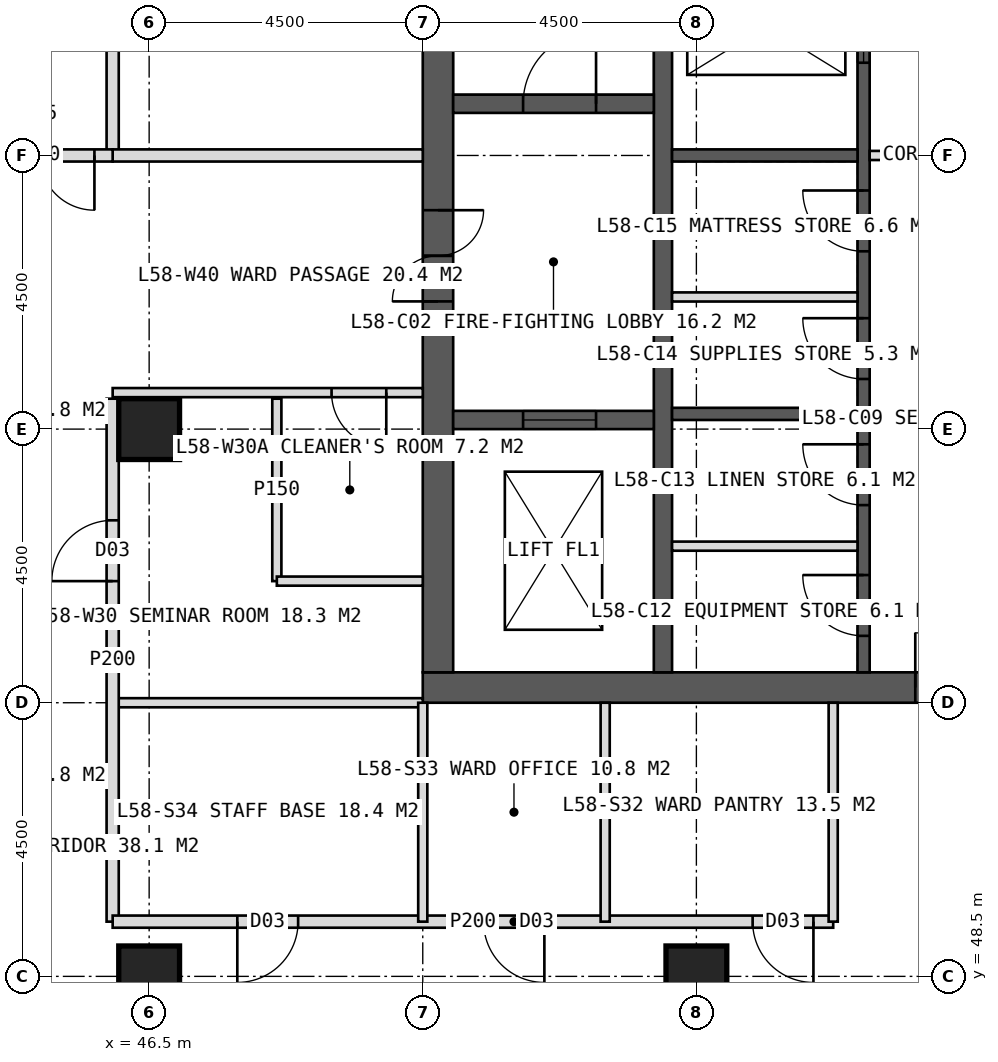
"""IFC4 building model, lengths in metres.
Left out: names, types, materials, properties, quantities, classifications, styles, units other than length and angle.
Written with IfcOpenShell. Run it as: python <this file> out.ifc"""

import sys

from ifc_helpers import new_model, si_unit, direction, frame, frame_2d, origin, origin_2d, place, context, subcontext, project, spatial, rectangle, hollow_rectangle, extrude, element, fill, save


model = new_model("IFC4")
c1 = context("Model", 3, precision=1e-05, world=origin(), true_north=direction((0.0, 1.0)))
c2 = subcontext(c1, "Body", "Model", "MODEL_VIEW")
j1 = project(units=[si_unit("LENGTHUNIT", "METRE"), si_unit("PLANEANGLEUNIT", "RADIAN")], contexts=[c1])
p1 = place(None, origin())
s1 = spatial("IfcSite", under=j1, at=p1, CompositionType="ELEMENT")
p2 = place(p1, origin())
s2 = spatial("IfcBuilding", under=s1, at=p2, CompositionType="ELEMENT")
p3 = place(p2, frame((0.0, 0.0, 241.0)))
s3 = spatial("IfcBuildingStorey", under=s2, at=p3, CompositionType="ELEMENT", Elevation=241.0)
p4 = place(p3, frame((51.0, 53.25, 0.0), z_axis=(0.0, 0.0, 1.0), x_axis=(1.0, 0.0, 0.0)))
e1 = element("IfcWall", 1, at=p4, inside=s3, PredefinedType="SHEAR", context=c2, shape_type="SweptSolid", body=[
    extrude(rectangle(XDim=18.0, YDim=0.5, at=frame_2d((9.0, 0.0))), origin(), (0.0, 0.0, 1.0), 4.0),
])
p5 = place(p4, frame((8.1, 0.0, 0.0)))
e2 = element("IfcOpeningElement", 2, at=p5, cuts=e1, PredefinedType="OPENING", context=c2, shape_type="SweptSolid", body=[
    extrude(rectangle(XDim=1.8, YDim=2.2, at=frame_2d((0.9, 1.1))), frame((0.0, 0.26, 0.0), z_axis=(0.0, -1.0, 0.0), x_axis=(1.0, 0.0, 0.0)), (0.0, 0.0, 1.0), 0.52),
])
p6 = place(p3, frame((51.25, 53.5, 0.0), z_axis=(0.0, 0.0, 1.0), x_axis=(0.0, 1.0, 0.0)))
e3 = element("IfcWall", 3, at=p6, inside=s3, PredefinedType="SHEAR", context=c2, shape_type="SweptSolid", body=[
    extrude(rectangle(XDim=17.0, YDim=0.5, at=frame_2d((8.5, 0.0))), origin(), (0.0, 0.0, 1.0), 4.0),
])
p7 = place(p6, frame((6.1, 0.0, 0.0)))
e4 = element("IfcOpeningElement", 4, at=p7, cuts=e3, PredefinedType="OPENING", context=c2, shape_type="SweptSolid", body=[
    extrude(rectangle(XDim=1.5, YDim=2.2, at=frame_2d((0.75, 1.1))), frame((0.0, 0.26, 0.0), z_axis=(0.0, -1.0, 0.0), x_axis=(1.0, 0.0, 0.0)), (0.0, 0.0, 1.0), 0.52),
])
p8 = place(p3, frame((54.95, 53.5, 0.0), z_axis=(0.0, 0.0, 1.0), x_axis=(0.0, 1.0, 0.0)))
e5 = element("IfcWall", 5, at=p8, inside=s3, PredefinedType="SHEAR", context=c2, shape_type="SweptSolid", body=[
    extrude(rectangle(XDim=17.0, YDim=0.3, at=frame_2d((8.5, 0.0))), origin(), (0.0, 0.0, 1.0), 4.0),
])
p9 = place(p3, frame((58.25, 53.5, 0.0), z_axis=(0.0, 0.0, 1.0), x_axis=(0.0, 1.0, 0.0)))
e6 = element("IfcWall", 6, at=p9, inside=s3, PredefinedType="SHEAR", context=c2, shape_type="SweptSolid", body=[
    extrude(rectangle(XDim=17.0, YDim=0.2, at=frame_2d((8.5, 0.0))), origin(), (0.0, 0.0, 1.0), 4.0),
])
p10 = place(p9, frame((0.6, 0.0, 0.0)))
e7 = element("IfcOpeningElement", 7, at=p10, cuts=e6, PredefinedType="OPENING", context=c2, shape_type="SweptSolid", body=[
    extrude(rectangle(XDim=1.0, YDim=2.1, at=frame_2d((0.5, 1.05))), frame((0.0, 0.11, 0.0), z_axis=(0.0, -1.0, 0.0), x_axis=(1.0, 0.0, 0.0)), (0.0, 0.0, 1.0), 0.22),
])
p11 = place(p9, frame((2.75, 0.0, 0.0)))
e8 = element("IfcOpeningElement", 8, at=p11, cuts=e6, PredefinedType="OPENING", context=c2, shape_type="SweptSolid", body=[
    extrude(rectangle(XDim=1.0, YDim=2.1, at=frame_2d((0.5, 1.05))), frame((0.0, 0.11, 0.0), z_axis=(0.0, -1.0, 0.0), x_axis=(1.0, 0.0, 0.0)), (0.0, 0.0, 1.0), 0.22),
])
p12 = place(p9, frame((4.824, 0.0, 0.0)))
e9 = element("IfcOpeningElement", 9, at=p12, cuts=e6, PredefinedType="OPENING", context=c2, shape_type="SweptSolid", body=[
    extrude(rectangle(XDim=1.0, YDim=2.1, at=frame_2d((0.5, 1.05))), frame((0.0, 0.11, 0.0), z_axis=(0.0, -1.0, 0.0), x_axis=(1.0, 0.0, 0.0)), (0.0, 0.0, 1.0), 0.22),
])
p13 = place(p9, frame((6.924, 0.0, 0.0)))
e10 = element("IfcOpeningElement", 10, at=p13, cuts=e6, PredefinedType="OPENING", context=c2, shape_type="SweptSolid", body=[
    extrude(rectangle(XDim=1.0, YDim=2.1, at=frame_2d((0.5, 1.05))), frame((0.0, 0.11, 0.0), z_axis=(0.0, -1.0, 0.0), x_axis=(1.0, 0.0, 0.0)), (0.0, 0.0, 1.0), 0.22),
])
p14 = place(p9, frame((10.025, 0.0, 0.0)))
e11 = element("IfcOpeningElement", 11, at=p14, cuts=e6, PredefinedType="OPENING", context=c2, shape_type="SweptSolid", body=[
    extrude(rectangle(XDim=1.4, YDim=2.2, at=frame_2d((0.7, 1.1))), frame((0.0, 0.11, 0.0), z_axis=(0.0, -1.0, 0.0), x_axis=(1.0, 0.0, 0.0)), (0.0, 0.0, 1.0), 0.22),
])
p15 = place(p9, frame((14.325, 0.0, 0.0)))
e12 = element("IfcOpeningElement", 12, at=p15, cuts=e6, PredefinedType="OPENING", context=c2, shape_type="SweptSolid", body=[
    extrude(rectangle(XDim=1.4, YDim=2.2, at=frame_2d((0.7, 1.1))), frame((0.0, 0.11, 0.0), z_axis=(0.0, -1.0, 0.0), x_axis=(1.0, 0.0, 0.0)), (0.0, 0.0, 1.0), 0.22),
])
for number, where, z_axis, x_axis in (
    (13, (55.1, 57.75, 0.0), (0.0, 0.0, 1.0), (1.0, 0.0, 0.0)),
    (14, (55.1, 62.0, 0.0), (0.0, 0.0, 1.0), (1.0, 0.0, 0.0)),
):
    element("IfcWall", number, at=place(p3, frame(where, z_axis=z_axis, x_axis=x_axis)), inside=s3, PredefinedType="SHEAR", context=c2, shape_type="SweptSolid", body=[
        extrude(rectangle(XDim=3.05, YDim=0.2, at=frame_2d((1.525, 0.0))), origin(), (0.0, 0.0, 1.0), 4.0),
    ])
p16 = place(p3, frame((51.5, 62.85, 0.0), z_axis=(0.0, 0.0, 1.0), x_axis=(1.0, 0.0, 0.0)))
e15 = element("IfcWall", 15, at=p16, inside=s3, PredefinedType="SHEAR", context=c2, shape_type="SweptSolid", body=[
    extrude(rectangle(XDim=3.3, YDim=0.3, at=frame_2d((1.65, 0.0))), origin(), (0.0, 0.0, 1.0), 4.0),
])
p17 = place(p16, frame((1.15, 0.0, 0.0)))
e16 = element("IfcOpeningElement", 16, at=p17, cuts=e15, PredefinedType="OPENING", context=c2, shape_type="SweptSolid", body=[
    extrude(rectangle(XDim=1.2, YDim=2.1, at=frame_2d((0.6, 1.05))), frame((0.0, 0.16, 0.0), z_axis=(0.0, -1.0, 0.0), x_axis=(1.0, 0.0, 0.0)), (0.0, 0.0, 1.0), 0.32),
])
p18 = place(p3, frame((51.5, 57.65, 0.0), z_axis=(0.0, 0.0, 1.0), x_axis=(1.0, 0.0, 0.0)))
e17 = element("IfcWall", 17, at=p18, inside=s3, PredefinedType="SHEAR", context=c2, shape_type="SweptSolid", body=[
    extrude(rectangle(XDim=3.3, YDim=0.3, at=frame_2d((1.65, 0.0))), origin(), (0.0, 0.0, 1.0), 4.0),
])
p19 = place(p18, frame((1.15, 0.0, 0.0)))
e18 = element("IfcOpeningElement", 18, at=p19, cuts=e17, PredefinedType="OPENING", context=c2, shape_type="SweptSolid", body=[
    extrude(rectangle(XDim=1.2, YDim=2.2, at=frame_2d((0.6, 1.1))), frame((0.0, 0.16, 0.0), z_axis=(0.0, -1.0, 0.0), x_axis=(1.0, 0.0, 0.0)), (0.0, 0.0, 1.0), 0.32),
])
for number, where, z_axis, x_axis in (
    (19, (46.5, 48.5, 0.0), (0.0, 0.0, 1.0), (1.0, 0.0, 0.0)),
    (20, (55.5, 48.5, 0.0), (0.0, 0.0, 1.0), (1.0, 0.0, 0.0)),
    (21, (46.5, 57.5, 0.0), (0.0, 0.0, 1.0), (1.0, 0.0, 0.0)),
):
    element("IfcColumn", number, at=place(p3, frame(where, z_axis=z_axis, x_axis=x_axis)), inside=s3, PredefinedType="COLUMN", context=c2, shape_type="SweptSolid", body=[
        extrude(hollow_rectangle(XDim=1.0, YDim=1.0, WallThickness=0.1, at=origin_2d()), origin(), (0.0, 0.0, 1.0), 4.0),
    ])
p20 = place(p3, frame((51.0, 53.0, 0.0), z_axis=(0.0, 0.0, 1.0), x_axis=(-1.0, 0.0, 0.0)))
e22 = element("IfcWall", 22, at=p20, inside=s3, PredefinedType="PARTITIONING", context=c2, shape_type="SweptSolid", body=[
    extrude(rectangle(XDim=5.1, YDim=0.15, at=frame_2d((2.55, 0.0))), origin(), (0.0, 0.0, 1.0), 3.75),
])
p21 = place(p3, frame((45.9, 49.4, 0.0), z_axis=(0.0, 0.0, 1.0), x_axis=(0.0, 1.0, 0.0)))
e23 = element("IfcWall", 23, at=p21, inside=s3, PredefinedType="PARTITIONING", context=c2, shape_type="SweptSolid", body=[
    extrude(rectangle(XDim=8.6, YDim=0.2, at=frame_2d((4.3, 0.0))), origin(), (0.0, 0.0, 1.0), 3.75),
])
p22 = place(p21, frame((5.6, 0.0, 0.0)))
e24 = element("IfcOpeningElement", 24, at=p22, cuts=e23, PredefinedType="OPENING", context=c2, shape_type="SweptSolid", body=[
    extrude(rectangle(XDim=1.0, YDim=2.1, at=frame_2d((0.5, 1.05))), frame((0.0, 0.11, 0.0), z_axis=(0.0, -1.0, 0.0), x_axis=(1.0, 0.0, 0.0)), (0.0, 0.0, 1.0), 0.22),
])
p23 = place(p3, frame((45.9, 62.0, 0.0), z_axis=(0.0, 0.0, 1.0), x_axis=(0.0, 1.0, 0.0)))
e25 = element("IfcWall", 25, at=p23, inside=s3, PredefinedType="PARTITIONING", context=c2, shape_type="SweptSolid", body=[
    extrude(rectangle(XDim=14.1, YDim=0.2, at=frame_2d((7.05, 0.0))), origin(), (0.0, 0.0, 1.0), 3.75),
])
p24 = place(p23, frame((2.5, 0.0, 0.0)))
e26 = element("IfcOpeningElement", 26, at=p24, cuts=e25, PredefinedType="OPENING", context=c2, shape_type="SweptSolid", body=[
    extrude(rectangle(XDim=1.0, YDim=2.1, at=frame_2d((0.5, 1.05))), frame((0.0, 0.11, 0.0), z_axis=(0.0, -1.0, 0.0), x_axis=(1.0, 0.0, 0.0)), (0.0, 0.0, 1.0), 0.22),
])
p25 = place(p23, frame((7.0, 0.0, 0.0)))
e27 = element("IfcOpeningElement", 27, at=p25, cuts=e25, PredefinedType="OPENING", context=c2, shape_type="SweptSolid", body=[
    extrude(rectangle(XDim=1.0, YDim=2.1, at=frame_2d((0.5, 1.05))), frame((0.0, 0.11, 0.0), z_axis=(0.0, -1.0, 0.0), x_axis=(1.0, 0.0, 0.0)), (0.0, 0.0, 1.0), 0.22),
])
p26 = place(p23, frame((11.05, 0.0, 0.0)))
e28 = element("IfcOpeningElement", 28, at=p26, cuts=e25, PredefinedType="OPENING", context=c2, shape_type="SweptSolid", body=[
    extrude(rectangle(XDim=1.0, YDim=2.1, at=frame_2d((0.5, 1.05))), frame((0.0, 0.11, 0.0), z_axis=(0.0, -1.0, 0.0), x_axis=(1.0, 0.0, 0.0)), (0.0, 0.0, 1.0), 0.22),
])
p27 = place(p3, frame((51.0, 58.1, 0.0), z_axis=(0.0, 0.0, 1.0), x_axis=(-1.0, 0.0, 0.0)))
e29 = element("IfcWall", 29, at=p27, inside=s3, PredefinedType="PARTITIONING", context=c2, shape_type="SweptSolid", body=[
    extrude(rectangle(XDim=5.1, YDim=0.15, at=frame_2d((2.55, 0.0))), origin(), (0.0, 0.0, 1.0), 3.75),
])
p28 = place(p27, frame((0.6, 0.0, 0.0)))
e30 = element("IfcOpeningElement", 30, at=p28, cuts=e29, PredefinedType="OPENING", context=c2, shape_type="SweptSolid", body=[
    extrude(rectangle(XDim=0.9, YDim=2.1, at=frame_2d((0.45, 1.05))), frame((0.0, 0.085, 0.0), z_axis=(0.0, -1.0, 0.0), x_axis=(1.0, 0.0, 0.0)), (0.0, 0.0, 1.0), 0.17),
])
p29 = place(p3, frame((51.0, 62.0, 0.0), z_axis=(0.0, 0.0, 1.0), x_axis=(-1.0, 0.0, 0.0)))
e31 = element("IfcWall", 31, at=p29, inside=s3, PredefinedType="SOLIDWALL", context=c2, shape_type="SweptSolid", body=[
    extrude(rectangle(XDim=5.1, YDim=0.2, at=frame_2d((2.55, 0.0))), origin(), (0.0, 0.0, 1.0), 2.95),
])
p30 = place(p3, frame((48.6, 55.0, 0.0), z_axis=(0.0, 0.0, 1.0), x_axis=(0.0, 1.0, 0.0)))
e32 = element("IfcWall", 32, at=p30, inside=s3, PredefinedType="PARTITIONING", context=c2, shape_type="SweptSolid", body=[
    extrude(rectangle(XDim=3.0, YDim=0.15, at=frame_2d((1.5, 0.0))), origin(), (0.0, 0.0, 1.0), 3.75),
])
p31 = place(p3, frame((51.0, 55.0, 0.0), z_axis=(0.0, 0.0, 1.0), x_axis=(-1.0, 0.0, 0.0)))
e33 = element("IfcWall", 33, at=p31, inside=s3, PredefinedType="PARTITIONING", context=c2, shape_type="SweptSolid", body=[
    extrude(rectangle(XDim=2.4, YDim=0.15, at=frame_2d((1.2, 0.0))), origin(), (0.0, 0.0, 1.0), 3.75),
])
p32 = place(p3, frame((57.75, 49.4, 0.0), z_axis=(0.0, 0.0, 1.0), x_axis=(-1.0, 0.0, 0.0)))
e34 = element("IfcWall", 34, at=p32, inside=s3, PredefinedType="PARTITIONING", context=c2, shape_type="SweptSolid", body=[
    extrude(rectangle(XDim=11.85, YDim=0.2, at=frame_2d((5.925, 0.0))), origin(), (0.0, 0.0, 1.0), 3.75),
])
p33 = place(p32, frame((0.325, 0.0, 0.0)))
e35 = element("IfcOpeningElement", 35, at=p33, cuts=e34, PredefinedType="OPENING", context=c2, shape_type="SweptSolid", body=[
    extrude(rectangle(XDim=1.0, YDim=2.1, at=frame_2d((0.5, 1.05))), frame((0.0, 0.11, 0.0), z_axis=(0.0, -1.0, 0.0), x_axis=(1.0, 0.0, 0.0)), (0.0, 0.0, 1.0), 0.22),
])
p34 = place(p32, frame((4.75, 0.0, 0.0)))
e36 = element("IfcOpeningElement", 36, at=p34, cuts=e34, PredefinedType="OPENING", context=c2, shape_type="SweptSolid", body=[
    extrude(rectangle(XDim=1.0, YDim=2.1, at=frame_2d((0.5, 1.05))), frame((0.0, 0.11, 0.0), z_axis=(0.0, -1.0, 0.0), x_axis=(1.0, 0.0, 0.0)), (0.0, 0.0, 1.0), 0.22),
])
p35 = place(p32, frame((8.8, 0.0, 0.0)))
e37 = element("IfcOpeningElement", 37, at=p35, cuts=e34, PredefinedType="OPENING", context=c2, shape_type="SweptSolid", body=[
    extrude(rectangle(XDim=1.0, YDim=2.1, at=frame_2d((0.5, 1.05))), frame((0.0, 0.11, 0.0), z_axis=(0.0, -1.0, 0.0), x_axis=(1.0, 0.0, 0.0)), (0.0, 0.0, 1.0), 0.22),
])
for number, where, z_axis, x_axis in (
    (38, (57.75, 53.0, 0.0), (0.0, 0.0, 1.0), (0.0, -1.0, 0.0)),
    (39, (54.0, 53.0, 0.0), (0.0, 0.0, 1.0), (0.0, -1.0, 0.0)),
    (40, (51.0, 53.0, 0.0), (0.0, 0.0, 1.0), (0.0, -1.0, 0.0)),
):
    element("IfcWall", number, at=place(p3, frame(where, z_axis=z_axis, x_axis=x_axis)), inside=s3, PredefinedType="PARTITIONING", context=c2, shape_type="SweptSolid", body=[
        extrude(rectangle(XDim=3.6, YDim=0.15, at=frame_2d((1.8, 0.0))), origin(), (0.0, 0.0, 1.0), 3.75),
    ])
p36 = place(p3, frame((45.9, 62.0, 0.0), z_axis=(0.0, 0.0, 1.0), x_axis=(-1.0, 0.0, 0.0)))
e41 = element("IfcWall", 41, at=p36, inside=s3, PredefinedType="SOLIDWALL", context=c2, shape_type="SweptSolid", body=[
    extrude(rectangle(XDim=2.7, YDim=0.2, at=frame_2d((1.35, 0.0))), origin(), (0.0, 0.0, 1.0), 2.95),
])
p37 = place(p36, frame((0.3, 0.0, 0.0)))
e42 = element("IfcOpeningElement", 42, at=p37, cuts=e41, PredefinedType="OPENING", context=c2, shape_type="SweptSolid", body=[
    extrude(rectangle(XDim=1.8, YDim=2.2, at=frame_2d((0.9, 1.1))), frame((0.0, 0.11, 0.0), z_axis=(0.0, -1.0, 0.0), x_axis=(1.0, 0.0, 0.0)), (0.0, 0.0, 1.0), 0.22),
])
for number, where, z_axis, x_axis in (
    (43, (55.1, 55.575, 0.0), (0.0, 0.0, 1.0), (1.0, 0.0, 0.0)),
    (44, (55.1, 59.673, 0.0), (0.0, 0.0, 1.0), (1.0, 0.0, 0.0)),
):
    element("IfcWall", number, at=place(p3, frame(where, z_axis=z_axis, x_axis=x_axis)), inside=s3, PredefinedType="PARTITIONING", context=c2, shape_type="SweptSolid", body=[
        extrude(rectangle(XDim=3.05, YDim=0.15, at=frame_2d((1.525, 0.0))), origin(), (0.0, 0.0, 1.0), 3.75),
    ])
p38 = place(p3, frame((58.35, 62.0, 0.0), z_axis=(0.0, 0.0, 1.0), x_axis=(1.0, 0.0, 0.0)))
e45 = element("IfcWall", 45, at=p38, inside=s3, PredefinedType="PARTITIONING", context=c2, shape_type="SweptSolid", body=[
    extrude(rectangle(XDim=3.3, YDim=0.15, at=frame_2d((1.65, 0.0))), origin(), (0.0, 0.0, 1.0), 3.75),
])
p39 = place(p28, origin())
e46 = element("IfcDoor", 46, at=p39, inside=s3, OperationType="SINGLE_SWING_LEFT", PredefinedType="DOOR", context=c2, shape_type="SweptSolid", body=[
    extrude(rectangle(XDim=0.9, YDim=2.1, at=frame_2d((0.45, 1.05))), frame((0.0, 0.025, 0.0), z_axis=(0.0, -1.0, 0.0), x_axis=(1.0, 0.0, 0.0)), (0.0, 0.0, 1.0), 0.05),
])
fill(e30, e46)
p40 = place(p22, origin())
e47 = element("IfcDoor", 47, at=p40, inside=s3, OperationType="SINGLE_SWING_LEFT", PredefinedType="DOOR", context=c2, shape_type="SweptSolid", body=[
    extrude(rectangle(XDim=1.0, YDim=2.1, at=frame_2d((0.5, 1.05))), frame((0.0, 0.025, 0.0), z_axis=(0.0, -1.0, 0.0), x_axis=(1.0, 0.0, 0.0)), (0.0, 0.0, 1.0), 0.05),
])
fill(e24, e47)
p41 = place(p33, origin())
e48 = element("IfcDoor", 48, at=p41, inside=s3, OperationType="SINGLE_SWING_LEFT", PredefinedType="DOOR", context=c2, shape_type="SweptSolid", body=[
    extrude(rectangle(XDim=1.0, YDim=2.1, at=frame_2d((0.5, 1.05))), frame((0.0, 0.025, 0.0), z_axis=(0.0, -1.0, 0.0), x_axis=(1.0, 0.0, 0.0)), (0.0, 0.0, 1.0), 0.05),
])
fill(e35, e48)
p42 = place(p34, origin())
e49 = element("IfcDoor", 49, at=p42, inside=s3, OperationType="SINGLE_SWING_LEFT", PredefinedType="DOOR", context=c2, shape_type="SweptSolid", body=[
    extrude(rectangle(XDim=1.0, YDim=2.1, at=frame_2d((0.5, 1.05))), frame((0.0, 0.025, 0.0), z_axis=(0.0, -1.0, 0.0), x_axis=(1.0, 0.0, 0.0)), (0.0, 0.0, 1.0), 0.05),
])
fill(e36, e49)
p43 = place(p35, origin())
e50 = element("IfcDoor", 50, at=p43, inside=s3, OperationType="SINGLE_SWING_RIGHT", PredefinedType="DOOR", context=c2, shape_type="SweptSolid", body=[
    extrude(rectangle(XDim=1.0, YDim=2.1, at=frame_2d((0.5, 1.05))), frame((0.0, 0.025, 0.0), z_axis=(0.0, -1.0, 0.0), x_axis=(1.0, 0.0, 0.0)), (0.0, 0.0, 1.0), 0.05),
])
fill(e37, e50)
p44 = place(p37, origin())
e51 = element("IfcDoor", 51, at=p44, inside=s3, OperationType="DOUBLE_DOOR_DOUBLE_SWING", PredefinedType="DOOR", context=c2, shape_type="SweptSolid", body=[
    extrude(rectangle(XDim=1.8, YDim=2.2, at=frame_2d((0.9, 1.1))), frame((0.0, 0.025, 0.0), z_axis=(0.0, -1.0, 0.0), x_axis=(1.0, 0.0, 0.0)), (0.0, 0.0, 1.0), 0.05),
])
fill(e42, e51)
p45 = place(p7, origin())
e52 = element("IfcDoor", 52, at=p45, inside=s3, OperationType="DOUBLE_DOOR_SINGLE_SWING", PredefinedType="DOOR", context=c2, shape_type="SweptSolid", body=[
    extrude(rectangle(XDim=1.5, YDim=2.2, at=frame_2d((0.75, 1.1))), frame((0.0, 0.025, 0.0), z_axis=(0.0, -1.0, 0.0), x_axis=(1.0, 0.0, 0.0)), (0.0, 0.0, 1.0), 0.05),
])
fill(e4, e52)
p46 = place(p17, origin())
e53 = element("IfcDoor", 53, at=p46, inside=s3, OperationType="SINGLE_SWING_RIGHT", PredefinedType="DOOR", context=c2, shape_type="SweptSolid", body=[
    extrude(rectangle(XDim=1.2, YDim=2.1, at=frame_2d((0.6, 1.05))), frame((0.0, 0.025, 0.0), z_axis=(0.0, -1.0, 0.0), x_axis=(1.0, 0.0, 0.0)), (0.0, 0.0, 1.0), 0.05),
])
fill(e16, e53)
p47 = place(p19, origin())
e54 = element("IfcDoor", 54, at=p47, inside=s3, OperationType="SLIDING_TO_LEFT", PredefinedType="DOOR", context=c2, shape_type="SweptSolid", body=[
    extrude(rectangle(XDim=1.2, YDim=2.2, at=frame_2d((0.6, 1.1))), frame((0.0, 0.025, 0.0), z_axis=(0.0, -1.0, 0.0), x_axis=(1.0, 0.0, 0.0)), (0.0, 0.0, 1.0), 0.05),
])
fill(e18, e54)
p48 = place(p10, origin())
e55 = element("IfcDoor", 55, at=p48, inside=s3, OperationType="SINGLE_SWING_RIGHT", PredefinedType="DOOR", context=c2, shape_type="SweptSolid", body=[
    extrude(rectangle(XDim=1.0, YDim=2.1, at=frame_2d((0.5, 1.05))), frame((0.0, 0.025, 0.0), z_axis=(0.0, -1.0, 0.0), x_axis=(1.0, 0.0, 0.0)), (0.0, 0.0, 1.0), 0.05),
])
fill(e7, e55)
p49 = place(p11, origin())
e56 = element("IfcDoor", 56, at=p49, inside=s3, OperationType="SINGLE_SWING_RIGHT", PredefinedType="DOOR", context=c2, shape_type="SweptSolid", body=[
    extrude(rectangle(XDim=1.0, YDim=2.1, at=frame_2d((0.5, 1.05))), frame((0.0, 0.025, 0.0), z_axis=(0.0, -1.0, 0.0), x_axis=(1.0, 0.0, 0.0)), (0.0, 0.0, 1.0), 0.05),
])
fill(e8, e56)
p50 = place(p12, origin())
e57 = element("IfcDoor", 57, at=p50, inside=s3, OperationType="SINGLE_SWING_RIGHT", PredefinedType="DOOR", context=c2, shape_type="SweptSolid", body=[
    extrude(rectangle(XDim=1.0, YDim=2.1, at=frame_2d((0.5, 1.05))), frame((0.0, 0.025, 0.0), z_axis=(0.0, -1.0, 0.0), x_axis=(1.0, 0.0, 0.0)), (0.0, 0.0, 1.0), 0.05),
])
fill(e9, e57)
p51 = place(p13, origin())
e58 = element("IfcDoor", 58, at=p51, inside=s3, OperationType="SINGLE_SWING_RIGHT", PredefinedType="DOOR", context=c2, shape_type="SweptSolid", body=[
    extrude(rectangle(XDim=1.0, YDim=2.1, at=frame_2d((0.5, 1.05))), frame((0.0, 0.025, 0.0), z_axis=(0.0, -1.0, 0.0), x_axis=(1.0, 0.0, 0.0)), (0.0, 0.0, 1.0), 0.05),
])
fill(e10, e58)
p52 = place(p14, origin())
e59 = element("IfcDoor", 59, at=p52, inside=s3, OperationType="SLIDING_TO_LEFT", PredefinedType="DOOR", context=c2, shape_type="SweptSolid", body=[
    extrude(rectangle(XDim=1.4, YDim=2.2, at=frame_2d((0.7, 1.1))), frame((0.0, 0.025, 0.0), z_axis=(0.0, -1.0, 0.0), x_axis=(1.0, 0.0, 0.0)), (0.0, 0.0, 1.0), 0.05),
])
fill(e11, e59)
p53 = place(p5, origin())
e60 = element("IfcDoor", 60, at=p53, inside=s3, OperationType="DOUBLE_DOOR_SINGLE_SWING", PredefinedType="DOOR", context=c2, shape_type="SweptSolid", body=[
    extrude(rectangle(XDim=1.8, YDim=2.2, at=frame_2d((0.9, 1.1))), frame((0.0, 0.025, 0.0), z_axis=(0.0, -1.0, 0.0), x_axis=(1.0, 0.0, 0.0)), (0.0, 0.0, 1.0), 0.05),
])
fill(e2, e60)
save(model, sys.argv[1])
